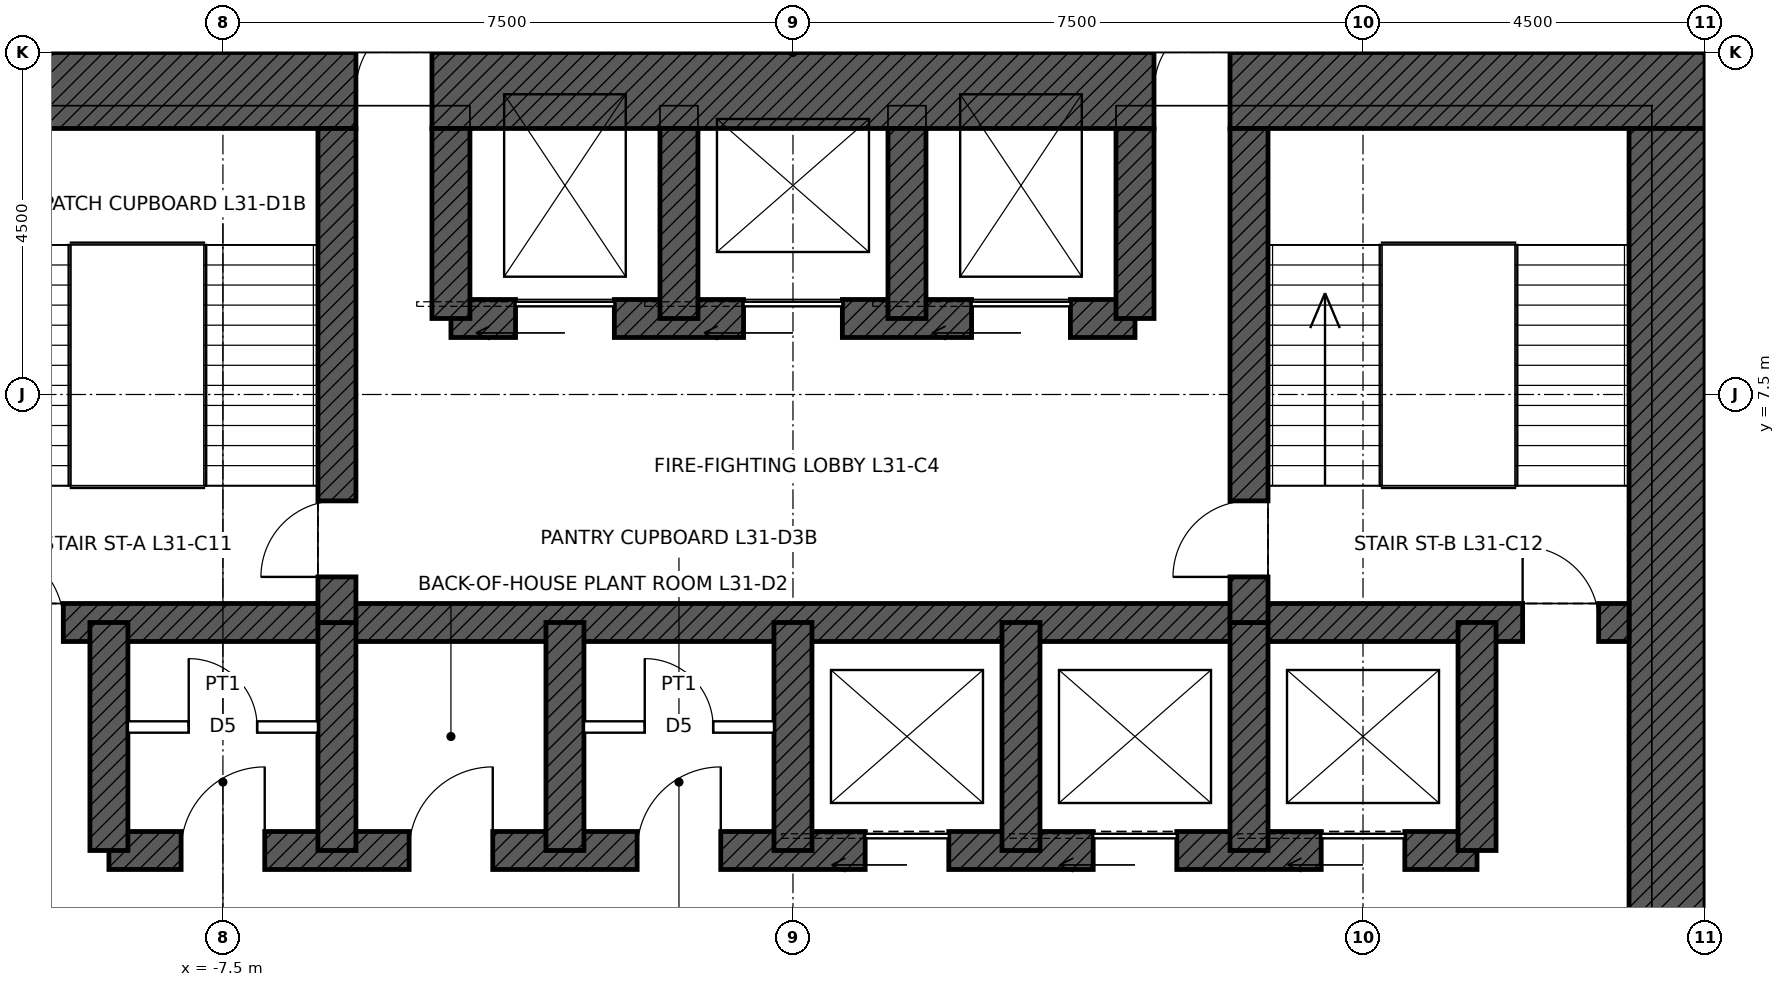
"""IFC4 building model, lengths in metres.
Left out: names, types, materials, properties, quantities, classifications, styles, units other than length and angle.
Written with IfcOpenShell. Run it as: python <this file> out.ifc"""

import sys

from ifc_helpers import new_model, si_unit, direction, frame, frame_2d, origin, place, context, subcontext, project, spatial, rectangle, extrude, element, fill, save


model = new_model("IFC4")
c1 = context("Model", 3, precision=1e-05, world=origin(), true_north=direction((0.0, 1.0)))
c2 = subcontext(c1, "Body", "Model", "MODEL_VIEW")
j1 = project(units=[si_unit("LENGTHUNIT", "METRE"), si_unit("PLANEANGLEUNIT", "RADIAN")], contexts=[c1])
p1 = place(None, origin())
s1 = spatial("IfcSite", under=j1, at=p1, CompositionType="ELEMENT")
p2 = place(p1, origin())
s2 = spatial("IfcBuilding", under=s1, at=p2, CompositionType="ELEMENT")
p3 = place(p2, frame((0.0, 0.0, 153.9)))
s3 = spatial("IfcBuildingStorey", under=s2, at=p3, CompositionType="ELEMENT", Elevation=153.9)
p4 = place(p3, frame((-12.0, 11.5, 0.0), z_axis=(0.0, 0.0, 1.0), x_axis=(1.0, 0.0, 0.0)))
e1 = element("IfcWall", 1, at=p4, inside=s3, PredefinedType="SHEAR", context=c2, shape_type="SweptSolid", body=[
    extrude(rectangle(XDim=24.0, YDim=1.0, at=frame_2d((12.0, 0.0))), origin(), (0.0, 0.0, 1.0), 4.5),
])
p5 = place(p4, frame((6.25, 0.0, 0.0)))
e2 = element("IfcOpeningElement", 2, at=p5, cuts=e1, PredefinedType="OPENING", context=c2, shape_type="SweptSolid", body=[
    extrude(rectangle(XDim=1.0, YDim=2.4, at=frame_2d((0.5, 1.2))), frame((0.0, 0.51, 0.0), z_axis=(0.0, -1.0, 0.0), x_axis=(1.0, 0.0, 0.0)), (0.0, 0.0, 1.0), 1.02),
])
p6 = place(p4, frame((16.75, 0.0, 0.0)))
e3 = element("IfcOpeningElement", 3, at=p6, cuts=e1, PredefinedType="OPENING", context=c2, shape_type="SweptSolid", body=[
    extrude(rectangle(XDim=1.0, YDim=2.4, at=frame_2d((0.5, 1.2))), frame((0.0, 0.51, 0.0), z_axis=(0.0, -1.0, 0.0), x_axis=(1.0, 0.0, 0.0)), (0.0, 0.0, 1.0), 1.02),
])
p7 = place(p3, frame((11.5, 11.0, 0.0), z_axis=(0.0, 0.0, 1.0), x_axis=(0.0, -1.0, 0.0)))
e4 = element("IfcWall", 4, at=p7, inside=s3, PredefinedType="SHEAR", context=c2, shape_type="SweptSolid", body=[
    extrude(rectangle(XDim=22.0, YDim=1.0, at=frame_2d((11.0, 0.0))), origin(), (0.0, 0.0, 1.0), 4.5),
])
p8 = place(p7, frame((10.5, 0.0, 0.0)))
e5 = element("IfcOpeningElement", 5, at=p8, cuts=e4, PredefinedType="OPENING", context=c2, shape_type="SweptSolid", body=[
    extrude(rectangle(XDim=1.0, YDim=2.4, at=frame_2d((0.5, 1.2))), frame((0.0, 0.51, 0.0), z_axis=(0.0, -1.0, 0.0), x_axis=(1.0, 0.0, 0.0)), (0.0, 0.0, 1.0), 1.02),
])
p9 = place(p3, frame((-11.0, 4.5, 0.0), z_axis=(0.0, 0.0, 1.0), x_axis=(1.0, 0.0, 0.0)))
e6 = element("IfcWall", 6, at=p9, inside=s3, PredefinedType="SHEAR", context=c2, shape_type="SweptSolid", body=[
    extrude(rectangle(XDim=22.0, YDim=0.5, at=frame_2d((11.0, 0.0))), origin(), (0.0, 0.0, 1.0), 4.5),
])
p10 = place(p9, frame((0.4, 0.0, 0.0)))
e7 = element("IfcOpeningElement", 7, at=p10, cuts=e6, PredefinedType="OPENING", context=c2, shape_type="SweptSolid", body=[
    extrude(rectangle(XDim=1.0, YDim=2.1, at=frame_2d((0.5, 1.05))), frame((0.0, 0.26, 0.0), z_axis=(0.0, -1.0, 0.0), x_axis=(1.0, 0.0, 0.0)), (0.0, 0.0, 1.0), 0.52),
])
p11 = place(p9, frame((20.6, 0.0, 0.0)))
e8 = element("IfcOpeningElement", 8, at=p11, cuts=e6, PredefinedType="OPENING", context=c2, shape_type="SweptSolid", body=[
    extrude(rectangle(XDim=1.0, YDim=2.1, at=frame_2d((0.5, 1.05))), frame((0.0, 0.26, 0.0), z_axis=(0.0, -1.0, 0.0), x_axis=(1.0, 0.0, 0.0)), (0.0, 0.0, 1.0), 0.52),
])
p12 = place(p3, frame((-9.0, 1.5, 0.0), z_axis=(0.0, 0.0, 1.0), x_axis=(1.0, 0.0, 0.0)))
e9 = element("IfcWall", 9, at=p12, inside=s3, PredefinedType="SHEAR", context=c2, shape_type="SweptSolid", body=[
    extrude(rectangle(XDim=18.0, YDim=0.5, at=frame_2d((9.0, 0.0))), origin(), (0.0, 0.0, 1.0), 4.5),
])
p13 = place(p12, frame((9.95, 0.0, 0.0)))
e10 = element("IfcOpeningElement", 10, at=p13, cuts=e9, PredefinedType="OPENING", context=c2, shape_type="SweptSolid", body=[
    extrude(rectangle(XDim=1.1, YDim=2.1, at=frame_2d((0.55, 1.05))), frame((0.0, 0.26, 0.0), z_axis=(0.0, -1.0, 0.0), x_axis=(1.0, 0.0, 0.0)), (0.0, 0.0, 1.0), 0.52),
])
p14 = place(p12, frame((12.95, 0.0, 0.0)))
e11 = element("IfcOpeningElement", 11, at=p14, cuts=e9, PredefinedType="OPENING", context=c2, shape_type="SweptSolid", body=[
    extrude(rectangle(XDim=1.1, YDim=2.1, at=frame_2d((0.55, 1.05))), frame((0.0, 0.26, 0.0), z_axis=(0.0, -1.0, 0.0), x_axis=(1.0, 0.0, 0.0)), (0.0, 0.0, 1.0), 0.52),
])
p15 = place(p12, frame((15.95, 0.0, 0.0)))
e12 = element("IfcOpeningElement", 12, at=p15, cuts=e9, PredefinedType="OPENING", context=c2, shape_type="SweptSolid", body=[
    extrude(rectangle(XDim=1.1, YDim=2.1, at=frame_2d((0.55, 1.05))), frame((0.0, 0.26, 0.0), z_axis=(0.0, -1.0, 0.0), x_axis=(1.0, 0.0, 0.0)), (0.0, 0.0, 1.0), 0.52),
])
p16 = place(p12, frame((0.95, 0.0, 0.0)))
e13 = element("IfcOpeningElement", 13, at=p16, cuts=e9, PredefinedType="OPENING", context=c2, shape_type="SweptSolid", body=[
    extrude(rectangle(XDim=1.1, YDim=2.1, at=frame_2d((0.55, 1.05))), frame((0.0, 0.26, 0.0), z_axis=(0.0, -1.0, 0.0), x_axis=(1.0, 0.0, 0.0)), (0.0, 0.0, 1.0), 0.52),
])
p17 = place(p12, frame((3.95, 0.0, 0.0)))
e14 = element("IfcOpeningElement", 14, at=p17, cuts=e9, PredefinedType="OPENING", context=c2, shape_type="SweptSolid", body=[
    extrude(rectangle(XDim=1.1, YDim=2.1, at=frame_2d((0.55, 1.05))), frame((0.0, 0.26, 0.0), z_axis=(0.0, -1.0, 0.0), x_axis=(1.0, 0.0, 0.0)), (0.0, 0.0, 1.0), 0.52),
])
p18 = place(p12, frame((6.95, 0.0, 0.0)))
e15 = element("IfcOpeningElement", 15, at=p18, cuts=e9, PredefinedType="OPENING", context=c2, shape_type="SweptSolid", body=[
    extrude(rectangle(XDim=1.1, YDim=2.1, at=frame_2d((0.55, 1.05))), frame((0.0, 0.26, 0.0), z_axis=(0.0, -1.0, 0.0), x_axis=(1.0, 0.0, 0.0)), (0.0, 0.0, 1.0), 0.52),
])
p19 = place(p3, frame((-4.5, 8.5, 0.0), z_axis=(0.0, 0.0, 1.0), x_axis=(1.0, 0.0, 0.0)))
e16 = element("IfcWall", 16, at=p19, inside=s3, PredefinedType="SHEAR", context=c2, shape_type="SweptSolid", body=[
    extrude(rectangle(XDim=9.0, YDim=0.5, at=frame_2d((4.5, 0.0))), origin(), (0.0, 0.0, 1.0), 4.5),
])
p20 = place(p19, frame((0.85, 0.0, 0.0)))
e17 = element("IfcOpeningElement", 17, at=p20, cuts=e16, PredefinedType="OPENING", context=c2, shape_type="SweptSolid", body=[
    extrude(rectangle(XDim=1.3, YDim=2.4, at=frame_2d((0.65, 1.2))), frame((0.0, 0.26, 0.0), z_axis=(0.0, -1.0, 0.0), x_axis=(1.0, 0.0, 0.0)), (0.0, 0.0, 1.0), 0.52),
])
p21 = place(p19, frame((6.85, 0.0, 0.0)))
e18 = element("IfcOpeningElement", 18, at=p21, cuts=e16, PredefinedType="OPENING", context=c2, shape_type="SweptSolid", body=[
    extrude(rectangle(XDim=1.3, YDim=2.4, at=frame_2d((0.65, 1.2))), frame((0.0, 0.26, 0.0), z_axis=(0.0, -1.0, 0.0), x_axis=(1.0, 0.0, 0.0)), (0.0, 0.0, 1.0), 0.52),
])
p22 = place(p19, frame((3.85, 0.0, 0.0)))
e19 = element("IfcOpeningElement", 19, at=p22, cuts=e16, PredefinedType="OPENING", context=c2, shape_type="SweptSolid", body=[
    extrude(rectangle(XDim=1.3, YDim=2.4, at=frame_2d((0.65, 1.2))), frame((0.0, 0.26, 0.0), z_axis=(0.0, -1.0, 0.0), x_axis=(1.0, 0.0, 0.0)), (0.0, 0.0, 1.0), 0.52),
])
for number, where, z_axis, x_axis in (
    (20, (-9.0, 1.5, 0.0), (0.0, 0.0, 1.0), (0.0, 1.0, 0.0)),
    (21, (9.0, 1.5, 0.0), (0.0, 0.0, 1.0), (0.0, 1.0, 0.0)),
    (22, (-6.0, 1.5, 0.0), (0.0, 0.0, 1.0), (0.0, 1.0, 0.0)),
    (23, (-3.0, 1.5, 0.0), (0.0, 0.0, 1.0), (0.0, 1.0, 0.0)),
    (24, (0.0, 1.5, 0.0), (0.0, 0.0, 1.0), (0.0, 1.0, 0.0)),
    (25, (3.0, 1.5, 0.0), (0.0, 0.0, 1.0), (0.0, 1.0, 0.0)),
    (26, (6.0, 1.5, 0.0), (0.0, 0.0, 1.0), (0.0, 1.0, 0.0)),
):
    element("IfcWall", number, at=place(p3, frame(where, z_axis=z_axis, x_axis=x_axis)), inside=s3, PredefinedType="SHEAR", context=c2, shape_type="SweptSolid", body=[
        extrude(rectangle(XDim=3.0, YDim=0.5, at=frame_2d((1.5, 0.0))), origin(), (0.0, 0.0, 1.0), 4.5),
    ])
p23 = place(p3, frame((-6.0, 4.5, 0.0), z_axis=(0.0, 0.0, 1.0), x_axis=(0.0, 1.0, 0.0)))
e27 = element("IfcWall", 27, at=p23, inside=s3, PredefinedType="SHEAR", context=c2, shape_type="SweptSolid", body=[
    extrude(rectangle(XDim=6.5, YDim=0.5, at=frame_2d((3.25, 0.0))), origin(), (0.0, 0.0, 1.0), 4.5),
])
p24 = place(p23, frame((0.6, 0.0, 0.0)))
e28 = element("IfcOpeningElement", 28, at=p24, cuts=e27, PredefinedType="OPENING", context=c2, shape_type="SweptSolid", body=[
    extrude(rectangle(XDim=1.0, YDim=2.1, at=frame_2d((0.5, 1.05))), frame((0.0, 0.26, 0.0), z_axis=(0.0, -1.0, 0.0), x_axis=(1.0, 0.0, 0.0)), (0.0, 0.0, 1.0), 0.52),
])
p25 = place(p3, frame((6.0, 4.5, 0.0), z_axis=(0.0, 0.0, 1.0), x_axis=(0.0, 1.0, 0.0)))
e29 = element("IfcWall", 29, at=p25, inside=s3, PredefinedType="SHEAR", context=c2, shape_type="SweptSolid", body=[
    extrude(rectangle(XDim=6.5, YDim=0.5, at=frame_2d((3.25, 0.0))), origin(), (0.0, 0.0, 1.0), 4.5),
])
p26 = place(p25, frame((0.6, 0.0, 0.0)))
e30 = element("IfcOpeningElement", 30, at=p26, cuts=e29, PredefinedType="OPENING", context=c2, shape_type="SweptSolid", body=[
    extrude(rectangle(XDim=1.0, YDim=2.1, at=frame_2d((0.5, 1.05))), frame((0.0, 0.26, 0.0), z_axis=(0.0, -1.0, 0.0), x_axis=(1.0, 0.0, 0.0)), (0.0, 0.0, 1.0), 0.52),
])
for number, where, z_axis, x_axis in (
    (31, (-4.5, 8.5, 0.0), (0.0, 0.0, 1.0), (0.0, 1.0, 0.0)),
    (32, (4.5, 8.5, 0.0), (0.0, 0.0, 1.0), (0.0, 1.0, 0.0)),
    (33, (-1.5, 8.5, 0.0), (0.0, 0.0, 1.0), (0.0, 1.0, 0.0)),
    (34, (1.5, 8.5, 0.0), (0.0, 0.0, 1.0), (0.0, 1.0, 0.0)),
):
    element("IfcWall", number, at=place(p3, frame(where, z_axis=z_axis, x_axis=x_axis)), inside=s3, PredefinedType="SHEAR", context=c2, shape_type="SweptSolid", body=[
        extrude(rectangle(XDim=2.5, YDim=0.5, at=frame_2d((1.25, 0.0))), origin(), (0.0, 0.0, 1.0), 4.5),
    ])
p27 = place(p3, frame((0.0, 12.0, 0.0), z_axis=(0.0, 0.0, 1.0), x_axis=(0.0, 1.0, 0.0)))
e35 = element("IfcWall", 35, at=p27, inside=s3, PredefinedType="PARTITIONING", context=c2, shape_type="SweptSolid", body=[
    extrude(rectangle(XDim=10.39, YDim=0.15, at=frame_2d((5.195, 0.0))), origin(), (0.0, 0.0, 1.0), 3.431),
])
p28 = place(p3, frame((11.25, 12.0, 0.0), z_axis=(0.0, 0.0, 1.0), x_axis=(0.0, 1.0, 0.0)))
e36 = element("IfcWall", 36, at=p28, inside=s3, PredefinedType="PARTITIONING", context=c2, shape_type="SweptSolid", body=[
    extrude(rectangle(XDim=11.55, YDim=0.15, at=frame_2d((5.775, 0.0))), origin(), (0.0, 0.0, 1.0), 3.431),
])
p29 = place(p3, frame((-8.75, 3.125, 0.0), z_axis=(0.0, 0.0, 1.0), x_axis=(1.0, 0.0, 0.0)))
e37 = element("IfcWall", 37, at=p29, inside=s3, PredefinedType="PARTITIONING", context=c2, shape_type="SweptSolid", body=[
    extrude(rectangle(XDim=2.5, YDim=0.15, at=frame_2d((1.25, 0.0))), origin(), (0.0, 0.0, 1.0), 4.25),
])
p30 = place(p29, frame((0.8, 0.0, 0.0)))
e38 = element("IfcOpeningElement", 38, at=p30, cuts=e37, PredefinedType="OPENING", context=c2, shape_type="SweptSolid", body=[
    extrude(rectangle(XDim=0.9, YDim=2.1, at=frame_2d((0.45, 1.05))), frame((0.0, 0.085, 0.0), z_axis=(0.0, -1.0, 0.0), x_axis=(1.0, 0.0, 0.0)), (0.0, 0.0, 1.0), 0.17),
])
p31 = place(p3, frame((-2.75, 3.125, 0.0), z_axis=(0.0, 0.0, 1.0), x_axis=(1.0, 0.0, 0.0)))
e39 = element("IfcWall", 39, at=p31, inside=s3, PredefinedType="PARTITIONING", context=c2, shape_type="SweptSolid", body=[
    extrude(rectangle(XDim=2.5, YDim=0.15, at=frame_2d((1.25, 0.0))), origin(), (0.0, 0.0, 1.0), 4.25),
])
p32 = place(p31, frame((0.8, 0.0, 0.0)))
e40 = element("IfcOpeningElement", 40, at=p32, cuts=e39, PredefinedType="OPENING", context=c2, shape_type="SweptSolid", body=[
    extrude(rectangle(XDim=0.9, YDim=2.1, at=frame_2d((0.45, 1.05))), frame((0.0, 0.085, 0.0), z_axis=(0.0, -1.0, 0.0), x_axis=(1.0, 0.0, 0.0)), (0.0, 0.0, 1.0), 0.17),
])
p33 = place(p10, origin())
e41 = element("IfcDoor", 41, at=p33, inside=s3, OperationType="SINGLE_SWING_LEFT", PredefinedType="DOOR", context=c2, shape_type="SweptSolid", body=[
    extrude(rectangle(XDim=1.0, YDim=2.1, at=frame_2d((0.5, 1.05))), frame((0.0, 0.025, 0.0), z_axis=(0.0, -1.0, 0.0), x_axis=(1.0, 0.0, 0.0)), (0.0, 0.0, 1.0), 0.05),
])
fill(e7, e41)
p34 = place(p11, origin())
e42 = element("IfcDoor", 42, at=p34, inside=s3, OperationType="SINGLE_SWING_LEFT", PredefinedType="DOOR", context=c2, shape_type="SweptSolid", body=[
    extrude(rectangle(XDim=1.0, YDim=2.1, at=frame_2d((0.5, 1.05))), frame((0.0, 0.025, 0.0), z_axis=(0.0, -1.0, 0.0), x_axis=(1.0, 0.0, 0.0)), (0.0, 0.0, 1.0), 0.05),
])
fill(e8, e42)
p35 = place(p24, origin())
e43 = element("IfcDoor", 43, at=p35, inside=s3, OperationType="SINGLE_SWING_LEFT", PredefinedType="DOOR", context=c2, shape_type="SweptSolid", body=[
    extrude(rectangle(XDim=1.0, YDim=2.1, at=frame_2d((0.5, 1.05))), frame((0.0, 0.025, 0.0), z_axis=(0.0, -1.0, 0.0), x_axis=(1.0, 0.0, 0.0)), (0.0, 0.0, 1.0), 0.05),
])
fill(e28, e43)
p36 = place(p26, origin())
e44 = element("IfcDoor", 44, at=p36, inside=s3, OperationType="SINGLE_SWING_LEFT", PredefinedType="DOOR", context=c2, shape_type="SweptSolid", body=[
    extrude(rectangle(XDim=1.0, YDim=2.1, at=frame_2d((0.5, 1.05))), frame((0.0, 0.025, 0.0), z_axis=(0.0, -1.0, 0.0), x_axis=(1.0, 0.0, 0.0)), (0.0, 0.0, 1.0), 0.05),
])
fill(e30, e44)
p37 = place(p5, origin())
e45 = element("IfcDoor", 45, at=p37, inside=s3, OperationType="SINGLE_SWING_RIGHT", PredefinedType="DOOR", context=c2, shape_type="SweptSolid", body=[
    extrude(rectangle(XDim=1.0, YDim=2.4, at=frame_2d((0.5, 1.2))), frame((0.0, 0.485, 0.0), z_axis=(0.0, -1.0, 0.0), x_axis=(1.0, 0.0, 0.0)), (0.0, 0.0, 1.0), 0.05),
])
fill(e2, e45)
p38 = place(p6, origin())
e46 = element("IfcDoor", 46, at=p38, inside=s3, OperationType="SINGLE_SWING_RIGHT", PredefinedType="DOOR", context=c2, shape_type="SweptSolid", body=[
    extrude(rectangle(XDim=1.0, YDim=2.4, at=frame_2d((0.5, 1.2))), frame((0.0, 0.485, 0.0), z_axis=(0.0, -1.0, 0.0), x_axis=(1.0, 0.0, 0.0)), (0.0, 0.0, 1.0), 0.05),
])
fill(e3, e46)
p39 = place(p20, origin())
e47 = element("IfcDoor", 47, at=p39, inside=s3, OperationType="SLIDING_TO_LEFT", PredefinedType="DOOR", context=c2, shape_type="SweptSolid", body=[
    extrude(rectangle(XDim=1.3, YDim=2.4, at=frame_2d((0.65, 1.2))), frame((0.0, 0.025, 0.0), z_axis=(0.0, -1.0, 0.0), x_axis=(1.0, 0.0, 0.0)), (0.0, 0.0, 1.0), 0.05),
])
fill(e17, e47)
p40 = place(p21, origin())
e48 = element("IfcDoor", 48, at=p40, inside=s3, OperationType="SLIDING_TO_LEFT", PredefinedType="DOOR", context=c2, shape_type="SweptSolid", body=[
    extrude(rectangle(XDim=1.3, YDim=2.4, at=frame_2d((0.65, 1.2))), frame((0.0, 0.025, 0.0), z_axis=(0.0, -1.0, 0.0), x_axis=(1.0, 0.0, 0.0)), (0.0, 0.0, 1.0), 0.05),
])
fill(e18, e48)
p41 = place(p22, origin())
e49 = element("IfcDoor", 49, at=p41, inside=s3, OperationType="SLIDING_TO_LEFT", PredefinedType="DOOR", context=c2, shape_type="SweptSolid", body=[
    extrude(rectangle(XDim=1.3, YDim=2.4, at=frame_2d((0.65, 1.2))), frame((0.0, 0.025, 0.0), z_axis=(0.0, -1.0, 0.0), x_axis=(1.0, 0.0, 0.0)), (0.0, 0.0, 1.0), 0.05),
])
fill(e19, e49)
p42 = place(p13, origin())
e50 = element("IfcDoor", 50, at=p42, inside=s3, OperationType="SLIDING_TO_LEFT", PredefinedType="DOOR", context=c2, shape_type="SweptSolid", body=[
    extrude(rectangle(XDim=1.1, YDim=2.1, at=frame_2d((0.55, 1.05))), frame((0.0, 0.025, 0.0), z_axis=(0.0, -1.0, 0.0), x_axis=(1.0, 0.0, 0.0)), (0.0, 0.0, 1.0), 0.05),
])
fill(e10, e50)
p43 = place(p14, origin())
e51 = element("IfcDoor", 51, at=p43, inside=s3, OperationType="SLIDING_TO_LEFT", PredefinedType="DOOR", context=c2, shape_type="SweptSolid", body=[
    extrude(rectangle(XDim=1.1, YDim=2.1, at=frame_2d((0.55, 1.05))), frame((0.0, 0.025, 0.0), z_axis=(0.0, -1.0, 0.0), x_axis=(1.0, 0.0, 0.0)), (0.0, 0.0, 1.0), 0.05),
])
fill(e11, e51)
p44 = place(p15, origin())
e52 = element("IfcDoor", 52, at=p44, inside=s3, OperationType="SLIDING_TO_LEFT", PredefinedType="DOOR", context=c2, shape_type="SweptSolid", body=[
    extrude(rectangle(XDim=1.1, YDim=2.1, at=frame_2d((0.55, 1.05))), frame((0.0, 0.025, 0.0), z_axis=(0.0, -1.0, 0.0), x_axis=(1.0, 0.0, 0.0)), (0.0, 0.0, 1.0), 0.05),
])
fill(e12, e52)
p45 = place(p16, origin())
e53 = element("IfcDoor", 53, at=p45, inside=s3, OperationType="SINGLE_SWING_RIGHT", PredefinedType="DOOR", context=c2, shape_type="SweptSolid", body=[
    extrude(rectangle(XDim=1.1, YDim=2.1, at=frame_2d((0.55, 1.05))), frame((0.0, 0.025, 0.0), z_axis=(0.0, -1.0, 0.0), x_axis=(1.0, 0.0, 0.0)), (0.0, 0.0, 1.0), 0.05),
])
fill(e13, e53)
p46 = place(p30, origin())
e54 = element("IfcDoor", 54, at=p46, inside=s3, OperationType="SINGLE_SWING_LEFT", PredefinedType="DOOR", context=c2, shape_type="SweptSolid", body=[
    extrude(rectangle(XDim=0.9, YDim=2.1, at=frame_2d((0.45, 1.05))), frame((0.0, 0.025, 0.0), z_axis=(0.0, -1.0, 0.0), x_axis=(1.0, 0.0, 0.0)), (0.0, 0.0, 1.0), 0.05),
])
fill(e38, e54)
p47 = place(p17, origin())
e55 = element("IfcDoor", 55, at=p47, inside=s3, OperationType="SINGLE_SWING_RIGHT", PredefinedType="DOOR", context=c2, shape_type="SweptSolid", body=[
    extrude(rectangle(XDim=1.1, YDim=2.1, at=frame_2d((0.55, 1.05))), frame((0.0, 0.025, 0.0), z_axis=(0.0, -1.0, 0.0), x_axis=(1.0, 0.0, 0.0)), (0.0, 0.0, 1.0), 0.05),
])
fill(e14, e55)
p48 = place(p18, origin())
e56 = element("IfcDoor", 56, at=p48, inside=s3, OperationType="SINGLE_SWING_RIGHT", PredefinedType="DOOR", context=c2, shape_type="SweptSolid", body=[
    extrude(rectangle(XDim=1.1, YDim=2.1, at=frame_2d((0.55, 1.05))), frame((0.0, 0.025, 0.0), z_axis=(0.0, -1.0, 0.0), x_axis=(1.0, 0.0, 0.0)), (0.0, 0.0, 1.0), 0.05),
])
fill(e15, e56)
p49 = place(p32, origin())
e57 = element("IfcDoor", 57, at=p49, inside=s3, OperationType="SINGLE_SWING_LEFT", PredefinedType="DOOR", context=c2, shape_type="SweptSolid", body=[
    extrude(rectangle(XDim=0.9, YDim=2.1, at=frame_2d((0.45, 1.05))), frame((0.0, 0.025, 0.0), z_axis=(0.0, -1.0, 0.0), x_axis=(1.0, 0.0, 0.0)), (0.0, 0.0, 1.0), 0.05),
])
fill(e40, e57)
save(model, sys.argv[1])
